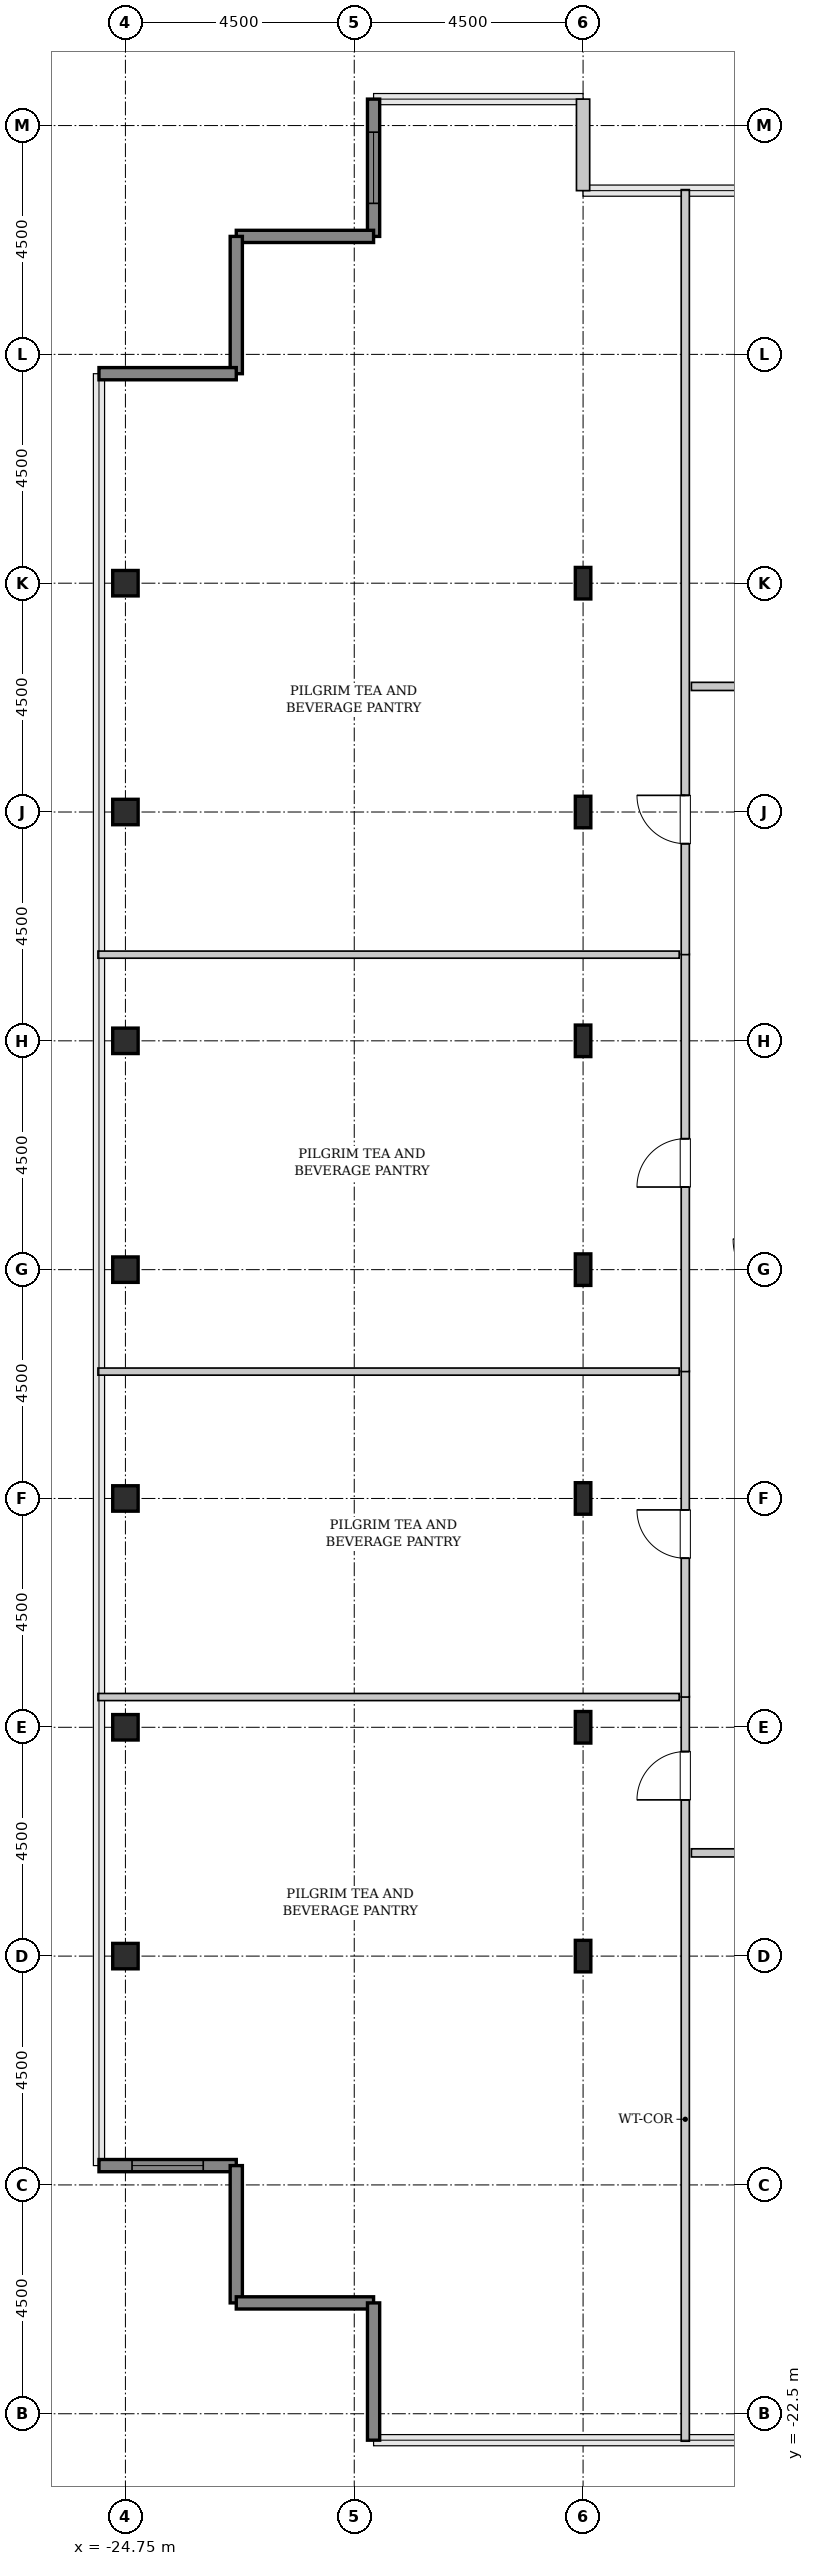
"""IFC4 building model, lengths in metres.
Left out: names, types, materials, properties, quantities, classifications, styles, units other than length and angle.
Written with IfcOpenShell. Run it as: python <this file> out.ifc"""

import sys

from ifc_helpers import new_model, si_unit, direction, frame, frame_2d, origin, origin_2d, place, context, subcontext, project, spatial, rectangle, hollow_rectangle, i_section, extrude, source, transform, mapped, element, fill, save


model = new_model("IFC4")
c1 = context("Model", 3, precision=1e-05, world=origin(), true_north=direction((0.0, 1.0)))
c2 = subcontext(c1, "Body", "Model", "MODEL_VIEW")
j1 = project(units=[si_unit("LENGTHUNIT", "METRE"), si_unit("PLANEANGLEUNIT", "RADIAN")], contexts=[c1])
p1 = place(None, origin())
s1 = spatial("IfcSite", under=j1, at=p1, CompositionType="ELEMENT")
p2 = place(p1, origin())
s2 = spatial("IfcBuilding", under=s1, at=p2, CompositionType="ELEMENT")
p3 = place(p2, frame((0.0, 0.0, 330.0)))
s3 = spatial("IfcBuildingStorey", under=s2, at=p3, CompositionType="ELEMENT", Elevation=330.0)
m1 = source(origin(), c2, "Body", "SweptSolid", [
    extrude(hollow_rectangle(XDim=0.5, YDim=0.5, WallThickness=0.025, InnerFilletRadius=0.025, OuterFilletRadius=0.05, at=origin_2d()), origin(), (0.0, 0.0, 1.0), 3.8),
])
for number, where, z_axis, x_axis in (
    (1, (-24.75, -13.5, 0.0), (0.0, 0.0, 1.0), (1.0, 0.0, 0.0)),
    (2, (-24.75, -9.0, 0.0), (0.0, 0.0, 1.0), (1.0, 0.0, 0.0)),
    (3, (-24.75, -4.5, 0.0), (0.0, 0.0, 1.0), (1.0, 0.0, 0.0)),
    (4, (-24.75, 0.0, 0.0), (0.0, 0.0, 1.0), (1.0, 0.0, 0.0)),
    (5, (-24.75, 4.5, 0.0), (0.0, 0.0, 1.0), (1.0, 0.0, 0.0)),
    (6, (-24.75, 9.0, 0.0), (0.0, 0.0, 1.0), (1.0, 0.0, 0.0)),
    (7, (-24.75, 13.5, 0.0), (0.0, 0.0, 1.0), (1.0, 0.0, 0.0)),
):
    element("IfcColumn", number, at=place(p3, frame(where, z_axis=z_axis, x_axis=x_axis)), inside=s3, PredefinedType="COLUMN", context=c2, shape_type="MappedRepresentation", body=[
        mapped(m1, transform((0.0, 0.0, 0.0), x_axis=(1.0, 0.0, 0.0), y_axis=(0.0, 1.0, 0.0), z_axis=(0.0, 0.0, 1.0), scale=1.0)),
    ])
m2 = source(origin(), c2, "Body", "SweptSolid", [
    extrude(i_section(OverallWidth=0.305, OverallDepth=0.62, WebThickness=0.021, FlangeThickness=0.04, FilletRadius=0.027, at=origin_2d()), origin(), (0.0, 0.0, 1.0), 3.8),
])
for number, where, z_axis, x_axis in (
    (8, (-15.75, -13.5, 0.0), (0.0, 0.0, 1.0), (1.0, 0.0, 0.0)),
    (9, (-15.75, -9.0, 0.0), (0.0, 0.0, 1.0), (1.0, 0.0, 0.0)),
    (10, (-15.75, -4.5, 0.0), (0.0, 0.0, 1.0), (1.0, 0.0, 0.0)),
    (11, (-15.75, 0.0, 0.0), (0.0, 0.0, 1.0), (1.0, 0.0, 0.0)),
    (12, (-15.75, 4.5, 0.0), (0.0, 0.0, 1.0), (1.0, 0.0, 0.0)),
    (13, (-15.75, 9.0, 0.0), (0.0, 0.0, 1.0), (1.0, 0.0, 0.0)),
    (14, (-15.75, 13.5, 0.0), (0.0, 0.0, 1.0), (1.0, 0.0, 0.0)),
):
    element("IfcColumn", number, at=place(p3, frame(where, z_axis=z_axis, x_axis=x_axis)), inside=s3, PredefinedType="COLUMN", context=c2, shape_type="MappedRepresentation", body=[
        mapped(m2, transform((0.0, 0.0, 0.0), x_axis=(1.0, 0.0, 0.0), y_axis=(0.0, 1.0, 0.0), z_axis=(0.0, 0.0, 1.0), scale=1.0)),
    ])
m3 = source(origin(), c2, "Body", "SweptSolid", [
    extrude(rectangle(XDim=1.8, YDim=0.26, at=frame_2d((0.9, 0.0))), origin(), (0.0, 0.0, 1.0), 3.55),
])
p4 = place(p3, frame((-15.75, 21.22, 0.0), z_axis=(0.0, 0.0, 1.0), x_axis=(0.0, 1.0, 0.0)))
e15 = element("IfcWall", 15, at=p4, inside=s3, PredefinedType="SOLIDWALL", context=c2, shape_type="MappedRepresentation", body=[
    mapped(m3, transform((0.0, 0.0, 0.0), x_axis=(1.0, 0.0, 0.0), y_axis=(0.0, 1.0, 0.0), z_axis=(0.0, 0.0, 1.0), scale=1.0)),
])
m4 = source(origin(), c2, "Body", "SweptSolid", [
    extrude(rectangle(XDim=2.7, YDim=0.24, at=frame_2d((1.35, 0.0))), origin(), (0.0, 0.0, 1.0), 3.55),
])
p5 = place(p3, frame((-19.87, 23.02, 0.0), z_axis=(0.0, 0.0, 1.0), x_axis=(0.0, -1.0, 0.0)))
e16 = element("IfcWall", 16, at=p5, inside=s3, PredefinedType="SHEAR", context=c2, shape_type="MappedRepresentation", body=[
    mapped(m4, transform((0.0, 0.0, 0.0), x_axis=(1.0, 0.0, 0.0), y_axis=(0.0, 1.0, 0.0), z_axis=(0.0, 0.0, 1.0), scale=1.0)),
])
p6 = place(p5, frame((0.65, 0.0, 0.85)))
e17 = element("IfcOpeningElement", 17, at=p6, cuts=e16, PredefinedType="OPENING", context=c2, shape_type="SweptSolid", body=[
    extrude(rectangle(XDim=1.4, YDim=1.8, at=frame_2d((0.7, 0.9))), frame((0.0, 0.13, 0.0), z_axis=(0.0, -1.0, 0.0), x_axis=(1.0, 0.0, 0.0)), (0.0, 0.0, 1.0), 0.26),
])
for number, where, z_axis, x_axis in (
    (18, (-19.87, 20.32, 0.0), (0.0, 0.0, 1.0), (-1.0, 0.0, 0.0)),
    (19, (-22.57, 20.32, 0.0), (0.0, 0.0, 1.0), (0.0, -1.0, 0.0)),
    (20, (-22.57, 17.62, 0.0), (0.0, 0.0, 1.0), (-1.0, 0.0, 0.0)),
):
    element("IfcWall", number, at=place(p3, frame(where, z_axis=z_axis, x_axis=x_axis)), inside=s3, PredefinedType="SHEAR", context=c2, shape_type="MappedRepresentation", body=[
        mapped(m4, transform((0.0, 0.0, 0.0), x_axis=(1.0, 0.0, 0.0), y_axis=(0.0, 1.0, 0.0), z_axis=(0.0, 0.0, 1.0), scale=1.0)),
    ])
p7 = place(p3, frame((-25.27, -17.62, 0.0), z_axis=(0.0, 0.0, 1.0), x_axis=(1.0, 0.0, 0.0)))
e21 = element("IfcWall", 21, at=p7, inside=s3, PredefinedType="SHEAR", context=c2, shape_type="MappedRepresentation", body=[
    mapped(m4, transform((0.0, 0.0, 0.0), x_axis=(1.0, 0.0, 0.0), y_axis=(0.0, 1.0, 0.0), z_axis=(0.0, 0.0, 1.0), scale=1.0)),
])
p8 = place(p7, frame((0.65, 0.0, 0.85)))
e22 = element("IfcOpeningElement", 22, at=p8, cuts=e21, PredefinedType="OPENING", context=c2, shape_type="SweptSolid", body=[
    extrude(rectangle(XDim=1.4, YDim=1.8, at=frame_2d((0.7, 0.9))), frame((0.0, 0.13, 0.0), z_axis=(0.0, -1.0, 0.0), x_axis=(1.0, 0.0, 0.0)), (0.0, 0.0, 1.0), 0.26),
])
for number, where, z_axis, x_axis in (
    (23, (-22.57, -17.62, 0.0), (0.0, 0.0, 1.0), (0.0, -1.0, 0.0)),
    (24, (-22.57, -20.32, 0.0), (0.0, 0.0, 1.0), (1.0, 0.0, 0.0)),
    (25, (-19.87, -20.32, 0.0), (0.0, 0.0, 1.0), (0.0, -1.0, 0.0)),
):
    element("IfcWall", number, at=place(p3, frame(where, z_axis=z_axis, x_axis=x_axis)), inside=s3, PredefinedType="SHEAR", context=c2, shape_type="MappedRepresentation", body=[
        mapped(m4, transform((0.0, 0.0, 0.0), x_axis=(1.0, 0.0, 0.0), y_axis=(0.0, 1.0, 0.0), z_axis=(0.0, 0.0, 1.0), scale=1.0)),
    ])
m5 = source(origin(), c2, "Body", "SweptSolid", [
    extrude(rectangle(XDim=14.645, YDim=0.16, at=frame_2d((7.323, 0.0))), origin(), (0.0, 0.0, 1.0), 3.535),
])
p9 = place(p3, frame((-13.74, -23.04, 0.0), z_axis=(0.0, 0.0, 1.0), x_axis=(0.0, 1.0, 0.0)))
e26 = element("IfcWall", 26, at=p9, inside=s3, PredefinedType="PARTITIONING", context=c2, shape_type="MappedRepresentation", body=[
    mapped(m5, transform((0.0, 0.0, 0.0), x_axis=(1.0, 0.0, 0.0), y_axis=(0.0, 1.0, 0.0), z_axis=(0.0, 0.0, 1.0), scale=1.0)),
])
p10 = place(p9, frame((12.613, 0.0, 0.0)))
e27 = element("IfcOpeningElement", 27, at=p10, cuts=e26, PredefinedType="OPENING", context=c2, shape_type="SweptSolid", body=[
    extrude(rectangle(XDim=0.95, YDim=2.1, at=frame_2d((0.475, 1.05))), frame((0.0, 0.09, 0.0), z_axis=(0.0, -1.0, 0.0), x_axis=(1.0, 0.0, 0.0)), (0.0, 0.0, 1.0), 0.18),
])
m6 = source(origin(), c2, "Body", "SweptSolid", [
    extrude(rectangle(XDim=11.43, YDim=0.14, at=frame_2d((5.715, 0.0))), origin(), (0.0, 0.0, 1.0), 3.535),
])
p11 = place(p3, frame((-25.29, -8.405, 0.0), z_axis=(0.0, 0.0, 1.0), x_axis=(1.0, 0.0, 0.0)))
e28 = element("IfcWall", 28, at=p11, inside=s3, PredefinedType="PARTITIONING", context=c2, shape_type="MappedRepresentation", body=[
    mapped(m6, transform((0.0, 0.0, 0.0), x_axis=(1.0, 0.0, 0.0), y_axis=(0.0, 1.0, 0.0), z_axis=(0.0, 0.0, 1.0), scale=1.0)),
])
m7 = source(origin(), c2, "Body", "SweptSolid", [
    extrude(rectangle(XDim=6.41, YDim=0.16, at=frame_2d((3.205, 0.0))), origin(), (0.0, 0.0, 1.0), 3.535),
])
p12 = place(p3, frame((-13.74, -8.405, 0.0), z_axis=(0.0, 0.0, 1.0), x_axis=(0.0, 1.0, 0.0)))
e29 = element("IfcWall", 29, at=p12, inside=s3, PredefinedType="PARTITIONING", context=c2, shape_type="MappedRepresentation", body=[
    mapped(m7, transform((0.0, 0.0, 0.0), x_axis=(1.0, 0.0, 0.0), y_axis=(0.0, 1.0, 0.0), z_axis=(0.0, 0.0, 1.0), scale=1.0)),
])
p13 = place(p12, frame((2.73, 0.0, 0.0)))
e30 = element("IfcOpeningElement", 30, at=p13, cuts=e29, PredefinedType="OPENING", context=c2, shape_type="SweptSolid", body=[
    extrude(rectangle(XDim=0.95, YDim=2.1, at=frame_2d((0.475, 1.05))), frame((0.0, 0.09, 0.0), z_axis=(0.0, -1.0, 0.0), x_axis=(1.0, 0.0, 0.0)), (0.0, 0.0, 1.0), 0.18),
])
p14 = place(p3, frame((-25.29, -2.005, 0.0), z_axis=(0.0, 0.0, 1.0), x_axis=(1.0, 0.0, 0.0)))
e31 = element("IfcWall", 31, at=p14, inside=s3, PredefinedType="PARTITIONING", context=c2, shape_type="MappedRepresentation", body=[
    mapped(m6, transform((0.0, 0.0, 0.0), x_axis=(1.0, 0.0, 0.0), y_axis=(0.0, 1.0, 0.0), z_axis=(0.0, 0.0, 1.0), scale=1.0)),
])
m8 = source(origin(), c2, "Body", "SweptSolid", [
    extrude(rectangle(XDim=8.21, YDim=0.16, at=frame_2d((4.105, 0.0))), origin(), (0.0, 0.0, 1.0), 3.535),
])
p15 = place(p3, frame((-13.74, -2.005, 0.0), z_axis=(0.0, 0.0, 1.0), x_axis=(0.0, 1.0, 0.0)))
e32 = element("IfcWall", 32, at=p15, inside=s3, PredefinedType="PARTITIONING", context=c2, shape_type="MappedRepresentation", body=[
    mapped(m8, transform((0.0, 0.0, 0.0), x_axis=(1.0, 0.0, 0.0), y_axis=(0.0, 1.0, 0.0), z_axis=(0.0, 0.0, 1.0), scale=1.0)),
])
p16 = place(p15, frame((3.63, 0.0, 0.0)))
e33 = element("IfcOpeningElement", 33, at=p16, cuts=e32, PredefinedType="OPENING", context=c2, shape_type="SweptSolid", body=[
    extrude(rectangle(XDim=0.95, YDim=2.1, at=frame_2d((0.475, 1.05))), frame((0.0, 0.09, 0.0), z_axis=(0.0, -1.0, 0.0), x_axis=(1.0, 0.0, 0.0)), (0.0, 0.0, 1.0), 0.18),
])
p17 = place(p3, frame((-25.29, 6.195, 0.0), z_axis=(0.0, 0.0, 1.0), x_axis=(1.0, 0.0, 0.0)))
e34 = element("IfcWall", 34, at=p17, inside=s3, PredefinedType="PARTITIONING", context=c2, shape_type="MappedRepresentation", body=[
    mapped(m6, transform((0.0, 0.0, 0.0), x_axis=(1.0, 0.0, 0.0), y_axis=(0.0, 1.0, 0.0), z_axis=(0.0, 0.0, 1.0), scale=1.0)),
])
m9 = source(origin(), c2, "Body", "SweptSolid", [
    extrude(rectangle(XDim=15.045, YDim=0.16, at=frame_2d((7.522, 0.0))), origin(), (0.0, 0.0, 1.0), 3.535),
])
p18 = place(p3, frame((-13.74, 6.195, 0.0), z_axis=(0.0, 0.0, 1.0), x_axis=(0.0, 1.0, 0.0)))
e35 = element("IfcWall", 35, at=p18, inside=s3, PredefinedType="PARTITIONING", context=c2, shape_type="MappedRepresentation", body=[
    mapped(m9, transform((0.0, 0.0, 0.0), x_axis=(1.0, 0.0, 0.0), y_axis=(0.0, 1.0, 0.0), z_axis=(0.0, 0.0, 1.0), scale=1.0)),
])
p19 = place(p18, frame((2.183, 0.0, 0.0)))
e36 = element("IfcOpeningElement", 36, at=p19, cuts=e35, PredefinedType="OPENING", context=c2, shape_type="SweptSolid", body=[
    extrude(rectangle(XDim=0.95, YDim=2.1, at=frame_2d((0.475, 1.05))), frame((0.0, 0.09, 0.0), z_axis=(0.0, -1.0, 0.0), x_axis=(1.0, 0.0, 0.0)), (0.0, 0.0, 1.0), 0.18),
])
m10 = source(origin(), c2, "Body", "SweptSolid", [
    extrude(rectangle(XDim=4.125, YDim=0.16, at=frame_2d((2.062, 0.0))), origin(), (0.0, 0.0, 1.0), 3.535),
])
p20 = place(p3, frame((-13.62, 11.47, 0.0), z_axis=(0.0, 0.0, 1.0), x_axis=(1.0, 0.0, 0.0)))
e37 = element("IfcWall", 37, at=p20, inside=s3, PredefinedType="PARTITIONING", context=c2, shape_type="MappedRepresentation", body=[
    mapped(m10, transform((0.0, 0.0, 0.0), x_axis=(1.0, 0.0, 0.0), y_axis=(0.0, 1.0, 0.0), z_axis=(0.0, 0.0, 1.0), scale=1.0)),
])
p21 = place(p20, frame((1.587, 0.0, 0.0)))
e38 = element("IfcOpeningElement", 38, at=p21, cuts=e37, PredefinedType="OPENING", context=c2, shape_type="SweptSolid", body=[
    extrude(rectangle(XDim=0.95, YDim=2.1, at=frame_2d((0.475, 1.05))), frame((0.0, 0.09, 0.0), z_axis=(0.0, -1.0, 0.0), x_axis=(1.0, 0.0, 0.0)), (0.0, 0.0, 1.0), 0.18),
])
m11 = source(origin(), c2, "Body", "SweptSolid", [
    extrude(rectangle(XDim=5.16, YDim=0.16, at=frame_2d((2.58, 0.0))), origin(), (0.0, 0.0, 1.0), 3.535),
])
p22 = place(p3, frame((-13.62, -11.47, 0.0), z_axis=(0.0, 0.0, 1.0), x_axis=(1.0, 0.0, 0.0)))
e39 = element("IfcWall", 39, at=p22, inside=s3, PredefinedType="PARTITIONING", context=c2, shape_type="MappedRepresentation", body=[
    mapped(m11, transform((0.0, 0.0, 0.0), x_axis=(1.0, 0.0, 0.0), y_axis=(0.0, 1.0, 0.0), z_axis=(0.0, 0.0, 1.0), scale=1.0)),
])
p23 = place(p22, frame((2.105, 0.0, 0.0)))
e40 = element("IfcOpeningElement", 40, at=p23, cuts=e39, PredefinedType="OPENING", context=c2, shape_type="SweptSolid", body=[
    extrude(rectangle(XDim=0.95, YDim=2.1, at=frame_2d((0.475, 1.05))), frame((0.0, 0.09, 0.0), z_axis=(0.0, -1.0, 0.0), x_axis=(1.0, 0.0, 0.0)), (0.0, 0.0, 1.0), 0.18),
])
m12 = source(origin(), c2, "Body", "SweptSolid", [
    extrude(rectangle(XDim=1.4, YDim=1.8, at=frame_2d((0.7, 0.9))), frame((0.0, 0.03, 0.0), z_axis=(0.0, -1.0, 0.0), x_axis=(1.0, 0.0, 0.0)), (0.0, 0.0, 1.0), 0.06),
])
p24 = place(p6, origin())
e41 = element("IfcWindow", 41, at=p24, inside=s3, PartitioningType="SINGLE_PANEL", PredefinedType="WINDOW", context=c2, shape_type="MappedRepresentation", body=[
    mapped(m12, transform((0.0, 0.0, 0.0), x_axis=(1.0, 0.0, 0.0), y_axis=(0.0, 1.0, 0.0), z_axis=(0.0, 0.0, 1.0), scale=1.0)),
])
fill(e17, e41)
p25 = place(p8, origin())
e42 = element("IfcWindow", 42, at=p25, inside=s3, PartitioningType="SINGLE_PANEL", PredefinedType="WINDOW", context=c2, shape_type="MappedRepresentation", body=[
    mapped(m12, transform((0.0, 0.0, 0.0), x_axis=(1.0, 0.0, 0.0), y_axis=(0.0, 1.0, 0.0), z_axis=(0.0, 0.0, 1.0), scale=1.0)),
])
fill(e22, e42)
m13 = source(origin(), c2, "Body", "SweptSolid", [
    extrude(rectangle(XDim=0.95, YDim=2.1, at=frame_2d((0.475, 1.05))), frame((0.0, 0.025, 0.0), z_axis=(0.0, -1.0, 0.0), x_axis=(1.0, 0.0, 0.0)), (0.0, 0.0, 1.0), 0.05),
])
p26 = place(p10, origin())
e43 = element("IfcDoor", 43, at=p26, inside=s3, OperationType="SINGLE_SWING_LEFT", PredefinedType="DOOR", context=c2, shape_type="MappedRepresentation", body=[
    mapped(m13, transform((0.0, 0.0, 0.0), x_axis=(1.0, 0.0, 0.0), y_axis=(0.0, 1.0, 0.0), z_axis=(0.0, 0.0, 1.0), scale=1.0)),
])
fill(e27, e43)
p27 = place(p13, origin())
e44 = element("IfcDoor", 44, at=p27, inside=s3, OperationType="SINGLE_SWING_RIGHT", PredefinedType="DOOR", context=c2, shape_type="MappedRepresentation", body=[
    mapped(m13, transform((0.0, 0.0, 0.0), x_axis=(1.0, 0.0, 0.0), y_axis=(0.0, 1.0, 0.0), z_axis=(0.0, 0.0, 1.0), scale=1.0)),
])
fill(e30, e44)
p28 = place(p16, origin())
e45 = element("IfcDoor", 45, at=p28, inside=s3, OperationType="SINGLE_SWING_LEFT", PredefinedType="DOOR", context=c2, shape_type="MappedRepresentation", body=[
    mapped(m13, transform((0.0, 0.0, 0.0), x_axis=(1.0, 0.0, 0.0), y_axis=(0.0, 1.0, 0.0), z_axis=(0.0, 0.0, 1.0), scale=1.0)),
])
fill(e33, e45)
p29 = place(p19, origin())
e46 = element("IfcDoor", 46, at=p29, inside=s3, OperationType="SINGLE_SWING_RIGHT", PredefinedType="DOOR", context=c2, shape_type="MappedRepresentation", body=[
    mapped(m13, transform((0.0, 0.0, 0.0), x_axis=(1.0, 0.0, 0.0), y_axis=(0.0, 1.0, 0.0), z_axis=(0.0, 0.0, 1.0), scale=1.0)),
])
fill(e36, e46)
save(model, sys.argv[1])
